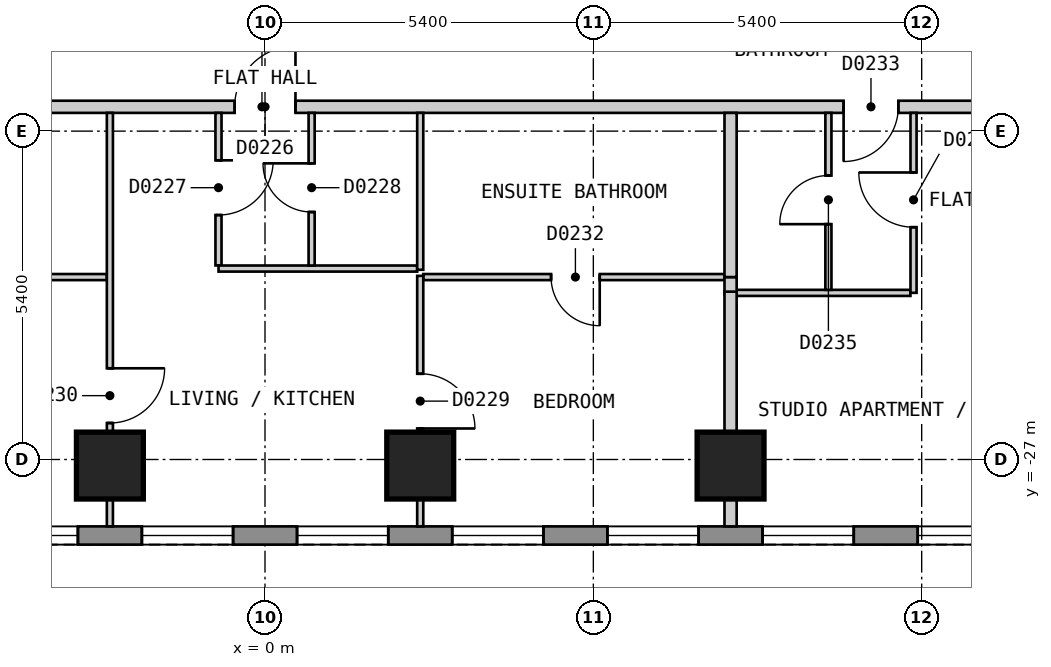
"""IFC4 building model, lengths in metres.
Left out: names, types, materials, properties, quantities, classifications, styles, units other than length and angle.
Written with IfcOpenShell. Run it as: python <this file> out.ifc"""

import sys

from ifc_helpers import new_model, si_unit, direction, frame, frame_2d, origin, origin_2d, place, context, subcontext, project, spatial, polyline, rectangle, outline, extrude, element, fill, save


model = new_model("IFC4")
c1 = context("Model", 3, precision=1e-05, world=origin(), true_north=direction((0.0, 1.0)))
c2 = subcontext(c1, "Body", "Model", "MODEL_VIEW")
j1 = project(units=[si_unit("LENGTHUNIT", "METRE"), si_unit("PLANEANGLEUNIT", "RADIAN")], contexts=[c1])
p1 = place(None, origin())
s1 = spatial("IfcSite", under=j1, at=p1, CompositionType="ELEMENT")
p2 = place(p1, origin())
s2 = spatial("IfcBuilding", under=s1, at=p2, CompositionType="ELEMENT")
p3 = place(p2, frame((0.0, 0.0, 47.4)))
s3 = spatial("IfcBuildingStorey", under=s2, at=p3, CompositionType="ELEMENT", Elevation=47.4)
for number, where, z_axis, x_axis in (
    (1, (-2.551, -27.1, 0.0), (0.0, 0.0, 1.0), (1.0, 0.0, 0.0)),
    (2, (2.553, -27.1, 0.0), (0.0, 0.0, 1.0), (1.0, 0.0, 0.0)),
    (3, (7.657, -27.1, 0.0), (0.0, 0.0, 1.0), (1.0, 0.0, 0.0)),
):
    element("IfcColumn", number, at=place(p3, frame(where, z_axis=z_axis, x_axis=x_axis)), inside=s3, PredefinedType="COLUMN", context=c2, shape_type="SweptSolid", body=[
        extrude(rectangle(XDim=1.1, YDim=1.1, at=origin_2d()), origin(), (0.0, 0.0, 1.0), 3.0),
    ])
p4 = place(p3, frame((-13.51, -28.25, 0.0), z_axis=(0.0, 0.0, 1.0), x_axis=(1.0, 0.0, 0.0)))
e4 = element("IfcWall", 4, at=p4, inside=s3, PredefinedType="SOLIDWALL", context=c2, shape_type="SweptSolid", body=[
    extrude(outline(polyline([(0.0, -0.15), (27.02, -0.15), (26.94, 0.15), (0.08, 0.15), (0.0, -0.15)])), origin(), (0.0, 0.0, 1.0), 2.7),
])
p5 = place(p4, frame((1.277, 0.0, 0.15)))
e5 = element("IfcOpeningElement", 5, at=p5, cuts=e4, PredefinedType="OPENING", context=c2, shape_type="SweptSolid", body=[
    extrude(rectangle(XDim=1.5, YDim=2.1, at=frame_2d((0.75, 1.05))), frame((0.0, 0.16, 0.0), z_axis=(0.0, -1.0, 0.0), x_axis=(1.0, 0.0, 0.0)), (0.0, 0.0, 1.0), 0.32),
])
p6 = place(p4, frame((3.829, 0.0, 0.15)))
e6 = element("IfcOpeningElement", 6, at=p6, cuts=e4, PredefinedType="OPENING", context=c2, shape_type="SweptSolid", body=[
    extrude(rectangle(XDim=1.5, YDim=2.1, at=frame_2d((0.75, 1.05))), frame((0.0, 0.16, 0.0), z_axis=(0.0, -1.0, 0.0), x_axis=(1.0, 0.0, 0.0)), (0.0, 0.0, 1.0), 0.32),
])
p7 = place(p4, frame((6.381, 0.0, 0.15)))
e7 = element("IfcOpeningElement", 7, at=p7, cuts=e4, PredefinedType="OPENING", context=c2, shape_type="SweptSolid", body=[
    extrude(rectangle(XDim=1.5, YDim=2.1, at=frame_2d((0.75, 1.05))), frame((0.0, 0.16, 0.0), z_axis=(0.0, -1.0, 0.0), x_axis=(1.0, 0.0, 0.0)), (0.0, 0.0, 1.0), 0.32),
])
p8 = place(p4, frame((8.933, 0.0, 0.15)))
e8 = element("IfcOpeningElement", 8, at=p8, cuts=e4, PredefinedType="OPENING", context=c2, shape_type="SweptSolid", body=[
    extrude(rectangle(XDim=1.5, YDim=2.1, at=frame_2d((0.75, 1.05))), frame((0.0, 0.16, 0.0), z_axis=(0.0, -1.0, 0.0), x_axis=(1.0, 0.0, 0.0)), (0.0, 0.0, 1.0), 0.32),
])
p9 = place(p4, frame((11.485, 0.0, 0.15)))
e9 = element("IfcOpeningElement", 9, at=p9, cuts=e4, PredefinedType="OPENING", context=c2, shape_type="SweptSolid", body=[
    extrude(rectangle(XDim=1.5, YDim=2.1, at=frame_2d((0.75, 1.05))), frame((0.0, 0.16, 0.0), z_axis=(0.0, -1.0, 0.0), x_axis=(1.0, 0.0, 0.0)), (0.0, 0.0, 1.0), 0.32),
])
p10 = place(p4, frame((14.037, 0.0, 0.15)))
e10 = element("IfcOpeningElement", 10, at=p10, cuts=e4, PredefinedType="OPENING", context=c2, shape_type="SweptSolid", body=[
    extrude(rectangle(XDim=1.5, YDim=2.1, at=frame_2d((0.75, 1.05))), frame((0.0, 0.16, 0.0), z_axis=(0.0, -1.0, 0.0), x_axis=(1.0, 0.0, 0.0)), (0.0, 0.0, 1.0), 0.32),
])
p11 = place(p4, frame((16.589, 0.0, 0.15)))
e11 = element("IfcOpeningElement", 11, at=p11, cuts=e4, PredefinedType="OPENING", context=c2, shape_type="SweptSolid", body=[
    extrude(rectangle(XDim=1.5, YDim=2.1, at=frame_2d((0.75, 1.05))), frame((0.0, 0.16, 0.0), z_axis=(0.0, -1.0, 0.0), x_axis=(1.0, 0.0, 0.0)), (0.0, 0.0, 1.0), 0.32),
])
p12 = place(p4, frame((19.141, 0.0, 0.15)))
e12 = element("IfcOpeningElement", 12, at=p12, cuts=e4, PredefinedType="OPENING", context=c2, shape_type="SweptSolid", body=[
    extrude(rectangle(XDim=1.5, YDim=2.1, at=frame_2d((0.75, 1.05))), frame((0.0, 0.16, 0.0), z_axis=(0.0, -1.0, 0.0), x_axis=(1.0, 0.0, 0.0)), (0.0, 0.0, 1.0), 0.32),
])
p13 = place(p4, frame((21.693, 0.0, 0.15)))
e13 = element("IfcOpeningElement", 13, at=p13, cuts=e4, PredefinedType="OPENING", context=c2, shape_type="SweptSolid", body=[
    extrude(rectangle(XDim=1.5, YDim=2.1, at=frame_2d((0.75, 1.05))), frame((0.0, 0.16, 0.0), z_axis=(0.0, -1.0, 0.0), x_axis=(1.0, 0.0, 0.0)), (0.0, 0.0, 1.0), 0.32),
])
p14 = place(p4, frame((24.245, 0.0, 0.15)))
e14 = element("IfcOpeningElement", 14, at=p14, cuts=e4, PredefinedType="OPENING", context=c2, shape_type="SweptSolid", body=[
    extrude(rectangle(XDim=1.5, YDim=2.1, at=frame_2d((0.75, 1.05))), frame((0.0, 0.16, 0.0), z_axis=(0.0, -1.0, 0.0), x_axis=(1.0, 0.0, 0.0)), (0.0, 0.0, 1.0), 0.32),
])
p15 = place(p3, frame((-15.499, -21.2, 0.0), z_axis=(0.0, 0.0, 1.0), x_axis=(1.0, 0.0, 0.0)))
e15 = element("IfcWall", 15, at=p15, inside=s3, PredefinedType="PARTITIONING", context=c2, shape_type="SweptSolid", body=[
    extrude(rectangle(XDim=30.898, YDim=0.2, at=frame_2d((15.449, 0.0))), origin(), (0.0, 0.0, 1.0), 2.7),
])
p16 = place(p15, frame((5.084, 0.0, 0.0)))
e16 = element("IfcOpeningElement", 16, at=p16, cuts=e15, PredefinedType="OPENING", context=c2, shape_type="SweptSolid", body=[
    extrude(rectangle(XDim=0.9, YDim=2.1, at=frame_2d((0.45, 1.05))), frame((0.0, 0.11, 0.0), z_axis=(0.0, -1.0, 0.0), x_axis=(1.0, 0.0, 0.0)), (0.0, 0.0, 1.0), 0.22),
])
p17 = place(p15, frame((15.0, 0.0, 0.0)))
e17 = element("IfcOpeningElement", 17, at=p17, cuts=e15, PredefinedType="OPENING", context=c2, shape_type="SweptSolid", body=[
    extrude(rectangle(XDim=1.0, YDim=2.1, at=frame_2d((0.5, 1.05))), frame((0.0, 0.11, 0.0), z_axis=(0.0, -1.0, 0.0), x_axis=(1.0, 0.0, 0.0)), (0.0, 0.0, 1.0), 0.22),
])
p18 = place(p15, frame((25.015, 0.0, 0.0)))
e18 = element("IfcOpeningElement", 18, at=p18, cuts=e15, PredefinedType="OPENING", context=c2, shape_type="SweptSolid", body=[
    extrude(rectangle(XDim=0.9, YDim=2.1, at=frame_2d((0.45, 1.05))), frame((0.0, 0.11, 0.0), z_axis=(0.0, -1.0, 0.0), x_axis=(1.0, 0.0, 0.0)), (0.0, 0.0, 1.0), 0.22),
])
p19 = place(p3, frame((-0.765, -21.3, 0.0), z_axis=(0.0, 0.0, 1.0), x_axis=(0.0, -1.0, 0.0)))
e19 = element("IfcWall", 19, at=p19, inside=s3, PredefinedType="PARTITIONING", context=c2, shape_type="SweptSolid", body=[
    extrude(rectangle(XDim=2.509, YDim=0.1, at=frame_2d((1.254, 0.0))), origin(), (0.0, 0.0, 1.0), 2.7),
])
p20 = place(p19, frame((0.78, 0.0, 0.0)))
e20 = element("IfcOpeningElement", 20, at=p20, cuts=e19, PredefinedType="OPENING", context=c2, shape_type="SweptSolid", body=[
    extrude(rectangle(XDim=0.9, YDim=2.1, at=frame_2d((0.45, 1.05))), frame((0.0, 0.06, 0.0), z_axis=(0.0, -1.0, 0.0), x_axis=(1.0, 0.0, 0.0)), (0.0, 0.0, 1.0), 0.12),
])
p21 = place(p3, frame((-0.764, -23.86, 0.0), z_axis=(0.0, 0.0, 1.0), x_axis=(1.0, 0.0, 0.0)))
e21 = element("IfcWall", 21, at=p21, inside=s3, PredefinedType="PARTITIONING", context=c2, shape_type="SweptSolid", body=[
    extrude(rectangle(XDim=3.267, YDim=0.1, at=frame_2d((1.633, 0.0))), origin(), (0.0, 0.0, 1.0), 2.7),
])
p22 = place(p3, frame((-7.555, -24.0, 0.0), z_axis=(0.0, 0.0, 1.0), x_axis=(1.0, 0.0, 0.0)))
e22 = element("IfcWall", 22, at=p22, inside=s3, PredefinedType="PARTITIONING", context=c2, shape_type="SweptSolid", body=[
    extrude(rectangle(XDim=4.954, YDim=0.1, at=frame_2d((2.477, 0.0))), origin(), (0.0, 0.0, 1.0), 2.7),
])
p23 = place(p22, frame((2.052, 0.0, 0.0)))
e23 = element("IfcOpeningElement", 23, at=p23, cuts=e22, PredefinedType="OPENING", context=c2, shape_type="SweptSolid", body=[
    extrude(rectangle(XDim=0.8, YDim=2.1, at=frame_2d((0.4, 1.05))), frame((0.0, 0.06, 0.0), z_axis=(0.0, -1.0, 0.0), x_axis=(1.0, 0.0, 0.0)), (0.0, 0.0, 1.0), 0.12),
])
p24 = place(p3, frame((2.603, -24.0, 0.0), z_axis=(0.0, 0.0, 1.0), x_axis=(1.0, 0.0, 0.0)))
e24 = element("IfcWall", 24, at=p24, inside=s3, PredefinedType="PARTITIONING", context=c2, shape_type="SweptSolid", body=[
    extrude(rectangle(XDim=4.954, YDim=0.1, at=frame_2d((2.477, 0.0))), origin(), (0.0, 0.0, 1.0), 2.7),
])
p25 = place(p24, frame((2.102, 0.0, 0.0)))
e25 = element("IfcOpeningElement", 25, at=p25, cuts=e24, PredefinedType="OPENING", context=c2, shape_type="SweptSolid", body=[
    extrude(rectangle(XDim=0.8, YDim=2.1, at=frame_2d((0.4, 1.05))), frame((0.0, 0.06, 0.0), z_axis=(0.0, -1.0, 0.0), x_axis=(1.0, 0.0, 0.0)), (0.0, 0.0, 1.0), 0.12),
])
p26 = place(p3, frame((7.757, -24.26, 0.0), z_axis=(0.0, 0.0, 1.0), x_axis=(1.0, 0.0, 0.0)))
e26 = element("IfcWall", 26, at=p26, inside=s3, PredefinedType="PARTITIONING", context=c2, shape_type="SweptSolid", body=[
    extrude(rectangle(XDim=2.858, YDim=0.1, at=frame_2d((1.429, 0.0))), origin(), (0.0, 0.0, 1.0), 2.7),
])
p27 = place(p3, frame((0.767, -23.81, 0.0), z_axis=(0.0, 0.0, 1.0), x_axis=(0.0, 1.0, 0.0)))
e27 = element("IfcWall", 27, at=p27, inside=s3, PredefinedType="PARTITIONING", context=c2, shape_type="SweptSolid", body=[
    extrude(rectangle(XDim=2.51, YDim=0.1, at=frame_2d((1.255, 0.0))), origin(), (0.0, 0.0, 1.0), 2.7),
])
p28 = place(p27, frame((0.88, 0.0, 0.0)))
e28 = element("IfcOpeningElement", 28, at=p28, cuts=e27, PredefinedType="OPENING", context=c2, shape_type="SweptSolid", body=[
    extrude(rectangle(XDim=0.8, YDim=2.1, at=frame_2d((0.4, 1.05))), frame((0.0, 0.06, 0.0), z_axis=(0.0, -1.0, 0.0), x_axis=(1.0, 0.0, 0.0)), (0.0, 0.0, 1.0), 0.12),
])
p29 = place(p3, frame((9.266, -24.21, 0.0), z_axis=(0.0, 0.0, 1.0), x_axis=(0.0, 1.0, 0.0)))
e29 = element("IfcWall", 29, at=p29, inside=s3, PredefinedType="PARTITIONING", context=c2, shape_type="SweptSolid", body=[
    extrude(rectangle(XDim=2.91, YDim=0.1, at=frame_2d((1.455, 0.0))), origin(), (0.0, 0.0, 1.0), 2.7),
])
p30 = place(p29, frame((1.08, 0.0, 0.0)))
e30 = element("IfcOpeningElement", 30, at=p30, cuts=e29, PredefinedType="OPENING", context=c2, shape_type="SweptSolid", body=[
    extrude(rectangle(XDim=0.8, YDim=2.1, at=frame_2d((0.4, 1.05))), frame((0.0, 0.06, 0.0), z_axis=(0.0, -1.0, 0.0), x_axis=(1.0, 0.0, 0.0)), (0.0, 0.0, 1.0), 0.12),
])
p31 = place(p3, frame((10.666, -24.259, 0.0), z_axis=(0.0, 0.0, 1.0), x_axis=(0.0, 1.0, 0.0)))
e31 = element("IfcWall", 31, at=p31, inside=s3, PredefinedType="PARTITIONING", context=c2, shape_type="SweptSolid", body=[
    extrude(rectangle(XDim=2.959, YDim=0.1, at=frame_2d((1.479, 0.0))), origin(), (0.0, 0.0, 1.0), 2.7),
])
p32 = place(p31, frame((1.079, 0.0, 0.0)))
e32 = element("IfcOpeningElement", 32, at=p32, cuts=e31, PredefinedType="OPENING", context=c2, shape_type="SweptSolid", body=[
    extrude(rectangle(XDim=0.9, YDim=2.1, at=frame_2d((0.45, 1.05))), frame((0.0, 0.06, 0.0), z_axis=(0.0, -1.0, 0.0), x_axis=(1.0, 0.0, 0.0)), (0.0, 0.0, 1.0), 0.12),
])
p33 = place(p3, frame((2.553, -28.1, 0.0), z_axis=(0.0, 0.0, 1.0), x_axis=(0.0, 1.0, 0.0)))
e33 = element("IfcWall", 33, at=p33, inside=s3, PredefinedType="PARTITIONING", context=c2, shape_type="SweptSolid", body=[
    extrude(rectangle(XDim=4.12, YDim=0.1, at=frame_2d((2.06, 0.0))), origin(), (0.0, 0.0, 1.0), 2.7),
])
p34 = place(p33, frame((1.61, 0.0, 0.0)))
e34 = element("IfcOpeningElement", 34, at=p34, cuts=e33, PredefinedType="OPENING", context=c2, shape_type="SweptSolid", body=[
    extrude(rectangle(XDim=0.9, YDim=2.1, at=frame_2d((0.45, 1.05))), frame((0.0, 0.06, 0.0), z_axis=(0.0, -1.0, 0.0), x_axis=(1.0, 0.0, 0.0)), (0.0, 0.0, 1.0), 0.12),
])
p35 = place(p3, frame((2.553, -23.88, 0.0), z_axis=(0.0, 0.0, 1.0), x_axis=(0.0, 1.0, 0.0)))
e35 = element("IfcWall", 35, at=p35, inside=s3, PredefinedType="PARTITIONING", context=c2, shape_type="SweptSolid", body=[
    extrude(rectangle(XDim=2.58, YDim=0.1, at=frame_2d((1.29, 0.0))), origin(), (0.0, 0.0, 1.0), 2.7),
])
p36 = place(p3, frame((-2.551, -28.1, 0.0), z_axis=(0.0, 0.0, 1.0), x_axis=(0.0, 1.0, 0.0)))
e36 = element("IfcWall", 36, at=p36, inside=s3, PredefinedType="PARTITIONING", context=c2, shape_type="SweptSolid", body=[
    extrude(rectangle(XDim=6.8, YDim=0.1, at=frame_2d((3.4, 0.0))), origin(), (0.0, 0.0, 1.0), 2.7),
])
p37 = place(p36, frame((1.7, 0.0, 0.0)))
e37 = element("IfcOpeningElement", 37, at=p37, cuts=e36, PredefinedType="OPENING", context=c2, shape_type="SweptSolid", body=[
    extrude(rectangle(XDim=0.9, YDim=2.1, at=frame_2d((0.45, 1.05))), frame((0.0, 0.06, 0.0), z_axis=(0.0, -1.0, 0.0), x_axis=(1.0, 0.0, 0.0)), (0.0, 0.0, 1.0), 0.12),
])
p38 = place(p3, frame((7.657, -24.0, 0.0), z_axis=(0.0, 0.0, 1.0), x_axis=(0.0, -1.0, 0.0)))
e38 = element("IfcWall", 38, at=p38, inside=s3, PredefinedType="PARTITIONING", context=c2, shape_type="SweptSolid", body=[
    extrude(rectangle(XDim=0.28, YDim=0.2, at=frame_2d((0.14, 0.0))), origin(), (0.0, 0.0, 1.0), 2.7),
])
p39 = place(p3, frame((7.657, -28.1, 0.0), z_axis=(0.0, 0.0, 1.0), x_axis=(0.0, 1.0, 0.0)))
e39 = element("IfcWall", 39, at=p39, inside=s3, PredefinedType="PARTITIONING", context=c2, shape_type="SweptSolid", body=[
    extrude(rectangle(XDim=3.86, YDim=0.2, at=frame_2d((1.93, 0.0))), origin(), (0.0, 0.0, 1.0), 2.7),
])
p40 = place(p3, frame((7.657, -24.0, 0.0), z_axis=(0.0, 0.0, 1.0), x_axis=(0.0, 1.0, 0.0)))
e40 = element("IfcWall", 40, at=p40, inside=s3, PredefinedType="PARTITIONING", context=c2, shape_type="SweptSolid", body=[
    extrude(rectangle(XDim=2.7, YDim=0.2, at=frame_2d((1.35, 0.0))), origin(), (0.0, 0.0, 1.0), 2.7),
])
p41 = place(p8, origin())
e41 = element("IfcWindow", 41, at=p41, inside=s3, PartitioningType="SINGLE_PANEL", PredefinedType="WINDOW", context=c2, shape_type="SweptSolid", body=[
    extrude(rectangle(XDim=1.5, YDim=2.1, at=frame_2d((0.75, 1.05))), frame((0.0, 0.03, 0.0), z_axis=(0.0, -1.0, 0.0), x_axis=(1.0, 0.0, 0.0)), (0.0, 0.0, 1.0), 0.06),
])
fill(e8, e41)
p42 = place(p9, origin())
e42 = element("IfcWindow", 42, at=p42, inside=s3, PartitioningType="SINGLE_PANEL", PredefinedType="WINDOW", context=c2, shape_type="SweptSolid", body=[
    extrude(rectangle(XDim=1.5, YDim=2.1, at=frame_2d((0.75, 1.05))), frame((0.0, 0.03, 0.0), z_axis=(0.0, -1.0, 0.0), x_axis=(1.0, 0.0, 0.0)), (0.0, 0.0, 1.0), 0.06),
])
fill(e9, e42)
p43 = place(p10, origin())
e43 = element("IfcWindow", 43, at=p43, inside=s3, PartitioningType="SINGLE_PANEL", PredefinedType="WINDOW", context=c2, shape_type="SweptSolid", body=[
    extrude(rectangle(XDim=1.5, YDim=2.1, at=frame_2d((0.75, 1.05))), frame((0.0, 0.03, 0.0), z_axis=(0.0, -1.0, 0.0), x_axis=(1.0, 0.0, 0.0)), (0.0, 0.0, 1.0), 0.06),
])
fill(e10, e43)
p44 = place(p11, origin())
e44 = element("IfcWindow", 44, at=p44, inside=s3, PartitioningType="SINGLE_PANEL", PredefinedType="WINDOW", context=c2, shape_type="SweptSolid", body=[
    extrude(rectangle(XDim=1.5, YDim=2.1, at=frame_2d((0.75, 1.05))), frame((0.0, 0.03, 0.0), z_axis=(0.0, -1.0, 0.0), x_axis=(1.0, 0.0, 0.0)), (0.0, 0.0, 1.0), 0.06),
])
fill(e11, e44)
p45 = place(p12, origin())
e45 = element("IfcWindow", 45, at=p45, inside=s3, PartitioningType="SINGLE_PANEL", PredefinedType="WINDOW", context=c2, shape_type="SweptSolid", body=[
    extrude(rectangle(XDim=1.5, YDim=2.1, at=frame_2d((0.75, 1.05))), frame((0.0, 0.03, 0.0), z_axis=(0.0, -1.0, 0.0), x_axis=(1.0, 0.0, 0.0)), (0.0, 0.0, 1.0), 0.06),
])
fill(e12, e45)
p46 = place(p13, origin())
e46 = element("IfcWindow", 46, at=p46, inside=s3, PartitioningType="SINGLE_PANEL", PredefinedType="WINDOW", context=c2, shape_type="SweptSolid", body=[
    extrude(rectangle(XDim=1.5, YDim=2.1, at=frame_2d((0.75, 1.05))), frame((0.0, 0.03, 0.0), z_axis=(0.0, -1.0, 0.0), x_axis=(1.0, 0.0, 0.0)), (0.0, 0.0, 1.0), 0.06),
])
fill(e13, e46)
p47 = place(p14, origin())
e47 = element("IfcWindow", 47, at=p47, inside=s3, PartitioningType="SINGLE_PANEL", PredefinedType="WINDOW", context=c2, shape_type="SweptSolid", body=[
    extrude(rectangle(XDim=1.5, YDim=2.1, at=frame_2d((0.75, 1.05))), frame((0.0, 0.03, 0.0), z_axis=(0.0, -1.0, 0.0), x_axis=(1.0, 0.0, 0.0)), (0.0, 0.0, 1.0), 0.06),
])
fill(e14, e47)
p48 = place(p17, origin())
e48 = element("IfcDoor", 48, at=p48, inside=s3, OperationType="SINGLE_SWING_RIGHT", PredefinedType="DOOR", context=c2, shape_type="SweptSolid", body=[
    extrude(rectangle(XDim=1.0, YDim=2.1, at=frame_2d((0.5, 1.05))), frame((0.0, 0.025, 0.0), z_axis=(0.0, -1.0, 0.0), x_axis=(1.0, 0.0, 0.0)), (0.0, 0.0, 1.0), 0.05),
])
fill(e17, e48)
p49 = place(p20, origin())
e49 = element("IfcDoor", 49, at=p49, inside=s3, OperationType="SINGLE_SWING_LEFT", PredefinedType="DOOR", context=c2, shape_type="SweptSolid", body=[
    extrude(rectangle(XDim=0.9, YDim=2.1, at=frame_2d((0.45, 1.05))), frame((0.0, 0.025, 0.0), z_axis=(0.0, -1.0, 0.0), x_axis=(1.0, 0.0, 0.0)), (0.0, 0.0, 1.0), 0.05),
])
fill(e20, e49)
p50 = place(p28, origin())
e50 = element("IfcDoor", 50, at=p50, inside=s3, OperationType="SINGLE_SWING_RIGHT", PredefinedType="DOOR", context=c2, shape_type="SweptSolid", body=[
    extrude(rectangle(XDim=0.8, YDim=2.1, at=frame_2d((0.4, 1.05))), frame((0.0, 0.025, 0.0), z_axis=(0.0, -1.0, 0.0), x_axis=(1.0, 0.0, 0.0)), (0.0, 0.0, 1.0), 0.05),
])
fill(e28, e50)
p51 = place(p34, origin())
e51 = element("IfcDoor", 51, at=p51, inside=s3, OperationType="SINGLE_SWING_LEFT", PredefinedType="DOOR", context=c2, shape_type="SweptSolid", body=[
    extrude(rectangle(XDim=0.9, YDim=2.1, at=frame_2d((0.45, 1.05))), frame((0.0, 0.025, 0.0), z_axis=(0.0, -1.0, 0.0), x_axis=(1.0, 0.0, 0.0)), (0.0, 0.0, 1.0), 0.05),
])
fill(e34, e51)
p52 = place(p37, origin())
e52 = element("IfcDoor", 52, at=p52, inside=s3, OperationType="SINGLE_SWING_RIGHT", PredefinedType="DOOR", context=c2, shape_type="SweptSolid", body=[
    extrude(rectangle(XDim=0.9, YDim=2.1, at=frame_2d((0.45, 1.05))), frame((0.0, 0.025, 0.0), z_axis=(0.0, -1.0, 0.0), x_axis=(1.0, 0.0, 0.0)), (0.0, 0.0, 1.0), 0.05),
])
fill(e37, e52)
p53 = place(p25, origin())
e53 = element("IfcDoor", 53, at=p53, inside=s3, OperationType="SINGLE_SWING_RIGHT", PredefinedType="DOOR", context=c2, shape_type="SweptSolid", body=[
    extrude(rectangle(XDim=0.8, YDim=2.1, at=frame_2d((0.4, 1.05))), frame((0.0, 0.025, 0.0), z_axis=(0.0, -1.0, 0.0), x_axis=(1.0, 0.0, 0.0)), (0.0, 0.0, 1.0), 0.05),
])
fill(e25, e53)
p54 = place(p18, origin())
e54 = element("IfcDoor", 54, at=p54, inside=s3, OperationType="SINGLE_SWING_LEFT", PredefinedType="DOOR", context=c2, shape_type="SweptSolid", body=[
    extrude(rectangle(XDim=0.9, YDim=2.1, at=frame_2d((0.45, 1.05))), frame((0.0, 0.025, 0.0), z_axis=(0.0, -1.0, 0.0), x_axis=(1.0, 0.0, 0.0)), (0.0, 0.0, 1.0), 0.05),
])
fill(e18, e54)
p55 = place(p32, origin())
e55 = element("IfcDoor", 55, at=p55, inside=s3, OperationType="SINGLE_SWING_RIGHT", PredefinedType="DOOR", context=c2, shape_type="SweptSolid", body=[
    extrude(rectangle(XDim=0.9, YDim=2.1, at=frame_2d((0.45, 1.05))), frame((0.0, 0.025, 0.0), z_axis=(0.0, -1.0, 0.0), x_axis=(1.0, 0.0, 0.0)), (0.0, 0.0, 1.0), 0.05),
])
fill(e32, e55)
p56 = place(p30, origin())
e56 = element("IfcDoor", 56, at=p56, inside=s3, OperationType="SINGLE_SWING_LEFT", PredefinedType="DOOR", context=c2, shape_type="SweptSolid", body=[
    extrude(rectangle(XDim=0.8, YDim=2.1, at=frame_2d((0.4, 1.05))), frame((0.0, 0.025, 0.0), z_axis=(0.0, -1.0, 0.0), x_axis=(1.0, 0.0, 0.0)), (0.0, 0.0, 1.0), 0.05),
])
fill(e30, e56)
save(model, sys.argv[1])
